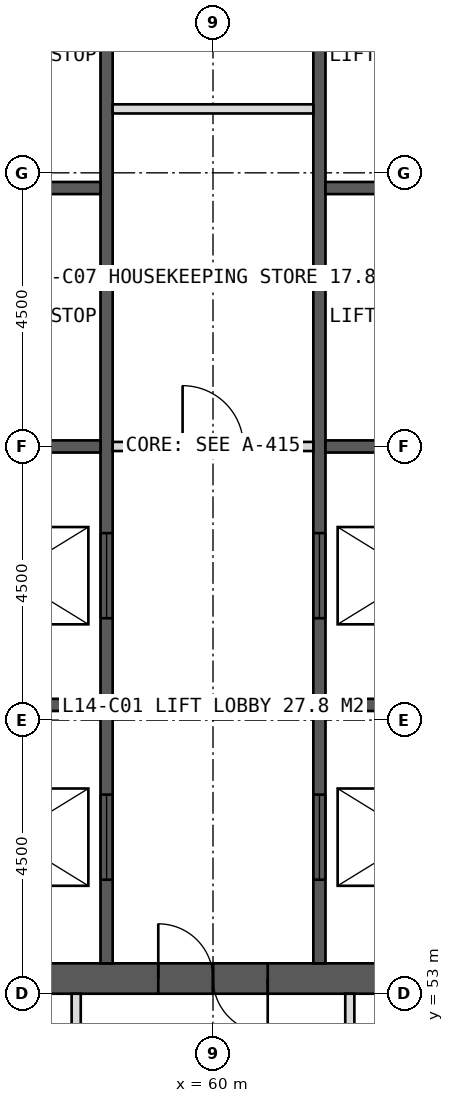
"""IFC4 building model, lengths in metres.
Left out: names, types, materials, properties, quantities, classifications, styles, units other than length and angle.
Written with IfcOpenShell. Run it as: python <this file> out.ifc"""

import sys

from ifc_helpers import new_model, si_unit, direction, frame, frame_2d, origin, place, context, subcontext, project, spatial, rectangle, extrude, element, fill, save


model = new_model("IFC4")
c1 = context("Model", 3, precision=1e-05, world=origin(), true_north=direction((0.0, 1.0)))
c2 = subcontext(c1, "Body", "Model", "MODEL_VIEW")
j1 = project(units=[si_unit("LENGTHUNIT", "METRE"), si_unit("PLANEANGLEUNIT", "RADIAN")], contexts=[c1])
p1 = place(None, origin())
s1 = spatial("IfcSite", under=j1, at=p1, CompositionType="ELEMENT")
p2 = place(p1, origin())
s2 = spatial("IfcBuilding", under=s1, at=p2, CompositionType="ELEMENT")
p3 = place(p2, frame((0.0, 0.0, 63.0)))
s3 = spatial("IfcBuildingStorey", under=s2, at=p3, CompositionType="ELEMENT", Elevation=63.0)
p4 = place(p3, frame((51.0, 53.25, 0.0), z_axis=(0.0, 0.0, 1.0), x_axis=(1.0, 0.0, 0.0)))
e1 = element("IfcWall", 1, at=p4, inside=s3, PredefinedType="SHEAR", context=c2, shape_type="SweptSolid", body=[
    extrude(rectangle(XDim=18.0, YDim=0.5, at=frame_2d((9.0, 0.0))), origin(), (0.0, 0.0, 1.0), 4.0),
])
p5 = place(p4, frame((8.1, 0.0, 0.0)))
e2 = element("IfcOpeningElement", 2, at=p5, cuts=e1, PredefinedType="OPENING", context=c2, shape_type="SweptSolid", body=[
    extrude(rectangle(XDim=1.8, YDim=2.2, at=frame_2d((0.9, 1.1))), frame((0.0, 0.26, 0.0), z_axis=(0.0, -1.0, 0.0), x_axis=(1.0, 0.0, 0.0)), (0.0, 0.0, 1.0), 0.52),
])
p6 = place(p3, frame((58.25, 53.5, 0.0), z_axis=(0.0, 0.0, 1.0), x_axis=(0.0, 1.0, 0.0)))
e3 = element("IfcWall", 3, at=p6, inside=s3, PredefinedType="SHEAR", context=c2, shape_type="SweptSolid", body=[
    extrude(rectangle(XDim=17.0, YDim=0.2, at=frame_2d((8.5, 0.0))), origin(), (0.0, 0.0, 1.0), 4.0),
])
p7 = place(p6, frame((1.375, 0.0, 0.0)))
e4 = element("IfcOpeningElement", 4, at=p7, cuts=e3, PredefinedType="OPENING", context=c2, shape_type="SweptSolid", body=[
    extrude(rectangle(XDim=1.4, YDim=2.2, at=frame_2d((0.7, 1.1))), frame((0.0, 0.11, 0.0), z_axis=(0.0, -1.0, 0.0), x_axis=(1.0, 0.0, 0.0)), (0.0, 0.0, 1.0), 0.22),
])
p8 = place(p6, frame((5.675, 0.0, 0.0)))
e5 = element("IfcOpeningElement", 5, at=p8, cuts=e3, PredefinedType="OPENING", context=c2, shape_type="SweptSolid", body=[
    extrude(rectangle(XDim=1.4, YDim=2.2, at=frame_2d((0.7, 1.1))), frame((0.0, 0.11, 0.0), z_axis=(0.0, -1.0, 0.0), x_axis=(1.0, 0.0, 0.0)), (0.0, 0.0, 1.0), 0.22),
])
p9 = place(p3, frame((61.75, 53.5, 0.0), z_axis=(0.0, 0.0, 1.0), x_axis=(0.0, 1.0, 0.0)))
e6 = element("IfcWall", 6, at=p9, inside=s3, PredefinedType="SHEAR", context=c2, shape_type="SweptSolid", body=[
    extrude(rectangle(XDim=17.0, YDim=0.2, at=frame_2d((8.5, 0.0))), origin(), (0.0, 0.0, 1.0), 4.0),
])
p10 = place(p9, frame((1.375, 0.0, 0.0)))
e7 = element("IfcOpeningElement", 7, at=p10, cuts=e6, PredefinedType="OPENING", context=c2, shape_type="SweptSolid", body=[
    extrude(rectangle(XDim=1.4, YDim=2.2, at=frame_2d((0.7, 1.1))), frame((0.0, 0.11, 0.0), z_axis=(0.0, -1.0, 0.0), x_axis=(1.0, 0.0, 0.0)), (0.0, 0.0, 1.0), 0.22),
])
p11 = place(p9, frame((5.675, 0.0, 0.0)))
e8 = element("IfcOpeningElement", 8, at=p11, cuts=e6, PredefinedType="OPENING", context=c2, shape_type="SweptSolid", body=[
    extrude(rectangle(XDim=1.4, YDim=2.2, at=frame_2d((0.7, 1.1))), frame((0.0, 0.11, 0.0), z_axis=(0.0, -1.0, 0.0), x_axis=(1.0, 0.0, 0.0)), (0.0, 0.0, 1.0), 0.22),
])
for number, where, z_axis, x_axis in (
    (9, (55.1, 57.75, 0.0), (0.0, 0.0, 1.0), (1.0, 0.0, 0.0)),
    (10, (61.85, 57.75, 0.0), (0.0, 0.0, 1.0), (1.0, 0.0, 0.0)),
    (11, (55.1, 62.0, 0.0), (0.0, 0.0, 1.0), (1.0, 0.0, 0.0)),
    (12, (61.85, 62.0, 0.0), (0.0, 0.0, 1.0), (1.0, 0.0, 0.0)),
    (13, (55.1, 66.25, 0.0), (0.0, 0.0, 1.0), (1.0, 0.0, 0.0)),
    (14, (61.85, 66.25, 0.0), (0.0, 0.0, 1.0), (1.0, 0.0, 0.0)),
):
    element("IfcWall", number, at=place(p3, frame(where, z_axis=z_axis, x_axis=x_axis)), inside=s3, PredefinedType="SHEAR", context=c2, shape_type="SweptSolid", body=[
        extrude(rectangle(XDim=3.05, YDim=0.2, at=frame_2d((1.525, 0.0))), origin(), (0.0, 0.0, 1.0), 4.0),
    ])
for number, where, z_axis, x_axis in (
    (15, (62.25, 53.0, 0.0), (0.0, 0.0, 1.0), (0.0, -1.0, 0.0)),
    (16, (57.75, 53.0, 0.0), (0.0, 0.0, 1.0), (0.0, -1.0, 0.0)),
):
    element("IfcWall", number, at=place(p3, frame(where, z_axis=z_axis, x_axis=x_axis)), inside=s3, PredefinedType="PARTITIONING", context=c2, shape_type="SweptSolid", body=[
        extrude(rectangle(XDim=7.5, YDim=0.15, at=frame_2d((3.75, 0.0))), origin(), (0.0, 0.0, 1.0), 3.75),
    ])
p12 = place(p3, frame((58.35, 62.0, 0.0), z_axis=(0.0, 0.0, 1.0), x_axis=(1.0, 0.0, 0.0)))
e17 = element("IfcWall", 17, at=p12, inside=s3, PredefinedType="PARTITIONING", context=c2, shape_type="SweptSolid", body=[
    extrude(rectangle(XDim=3.3, YDim=0.15, at=frame_2d((1.65, 0.0))), origin(), (0.0, 0.0, 1.0), 3.75),
])
p13 = place(p12, frame((1.15, 0.0, 0.0)))
e18 = element("IfcOpeningElement", 18, at=p13, cuts=e17, PredefinedType="OPENING", context=c2, shape_type="SweptSolid", body=[
    extrude(rectangle(XDim=1.0, YDim=2.1, at=frame_2d((0.5, 1.05))), frame((0.0, 0.085, 0.0), z_axis=(0.0, -1.0, 0.0), x_axis=(1.0, 0.0, 0.0)), (0.0, 0.0, 1.0), 0.17),
])
p14 = place(p3, frame((58.35, 67.551, 0.0), z_axis=(0.0, 0.0, 1.0), x_axis=(1.0, 0.0, 0.0)))
e19 = element("IfcWall", 19, at=p14, inside=s3, PredefinedType="PARTITIONING", context=c2, shape_type="SweptSolid", body=[
    extrude(rectangle(XDim=3.3, YDim=0.15, at=frame_2d((1.65, 0.0))), origin(), (0.0, 0.0, 1.0), 3.75),
])
p15 = place(p5, origin())
e20 = element("IfcDoor", 20, at=p15, inside=s3, OperationType="DOUBLE_DOOR_SINGLE_SWING", PredefinedType="DOOR", context=c2, shape_type="SweptSolid", body=[
    extrude(rectangle(XDim=1.8, YDim=2.2, at=frame_2d((0.9, 1.1))), frame((0.0, 0.025, 0.0), z_axis=(0.0, -1.0, 0.0), x_axis=(1.0, 0.0, 0.0)), (0.0, 0.0, 1.0), 0.05),
])
fill(e2, e20)
p16 = place(p7, origin())
e21 = element("IfcDoor", 21, at=p16, inside=s3, OperationType="SLIDING_TO_LEFT", PredefinedType="DOOR", context=c2, shape_type="SweptSolid", body=[
    extrude(rectangle(XDim=1.4, YDim=2.2, at=frame_2d((0.7, 1.1))), frame((0.0, 0.025, 0.0), z_axis=(0.0, -1.0, 0.0), x_axis=(1.0, 0.0, 0.0)), (0.0, 0.0, 1.0), 0.05),
])
fill(e4, e21)
p17 = place(p10, origin())
e22 = element("IfcDoor", 22, at=p17, inside=s3, OperationType="SLIDING_TO_LEFT", PredefinedType="DOOR", context=c2, shape_type="SweptSolid", body=[
    extrude(rectangle(XDim=1.4, YDim=2.2, at=frame_2d((0.7, 1.1))), frame((0.0, 0.025, 0.0), z_axis=(0.0, -1.0, 0.0), x_axis=(1.0, 0.0, 0.0)), (0.0, 0.0, 1.0), 0.05),
])
fill(e7, e22)
p18 = place(p8, origin())
e23 = element("IfcDoor", 23, at=p18, inside=s3, OperationType="SLIDING_TO_LEFT", PredefinedType="DOOR", context=c2, shape_type="SweptSolid", body=[
    extrude(rectangle(XDim=1.4, YDim=2.2, at=frame_2d((0.7, 1.1))), frame((0.0, 0.025, 0.0), z_axis=(0.0, -1.0, 0.0), x_axis=(1.0, 0.0, 0.0)), (0.0, 0.0, 1.0), 0.05),
])
fill(e5, e23)
p19 = place(p11, origin())
e24 = element("IfcDoor", 24, at=p19, inside=s3, OperationType="SLIDING_TO_LEFT", PredefinedType="DOOR", context=c2, shape_type="SweptSolid", body=[
    extrude(rectangle(XDim=1.4, YDim=2.2, at=frame_2d((0.7, 1.1))), frame((0.0, 0.025, 0.0), z_axis=(0.0, -1.0, 0.0), x_axis=(1.0, 0.0, 0.0)), (0.0, 0.0, 1.0), 0.05),
])
fill(e8, e24)
p20 = place(p13, origin())
e25 = element("IfcDoor", 25, at=p20, inside=s3, OperationType="SINGLE_SWING_LEFT", PredefinedType="DOOR", context=c2, shape_type="SweptSolid", body=[
    extrude(rectangle(XDim=1.0, YDim=2.1, at=frame_2d((0.5, 1.05))), frame((0.0, 0.025, 0.0), z_axis=(0.0, -1.0, 0.0), x_axis=(1.0, 0.0, 0.0)), (0.0, 0.0, 1.0), 0.05),
])
fill(e18, e25)
save(model, sys.argv[1])
